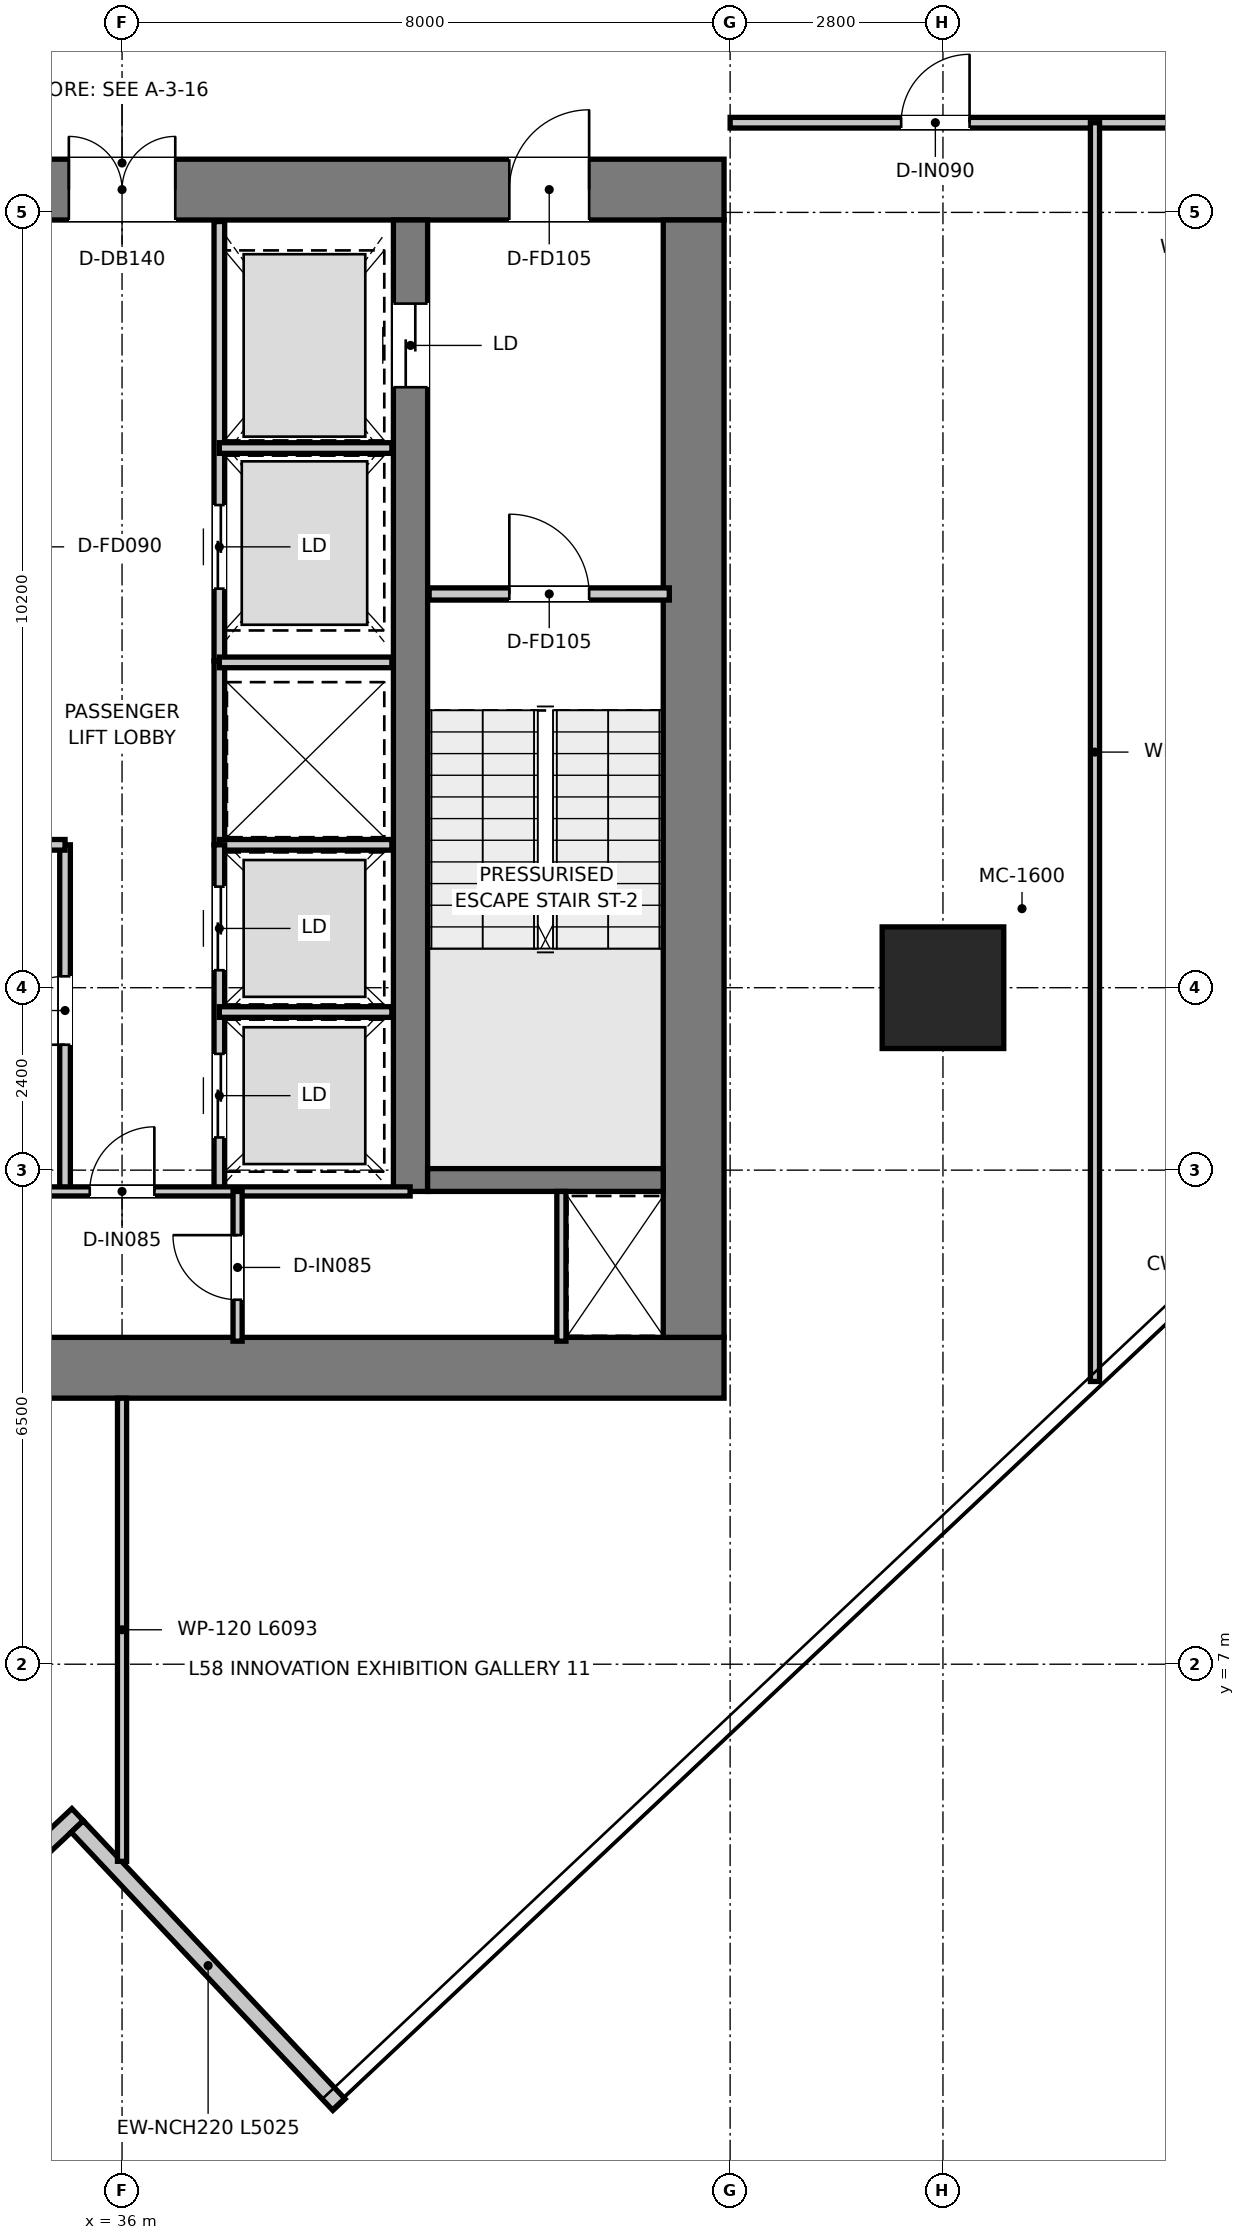
"""IFC4 building model, lengths in metres.
Left out: names, types, materials, properties, quantities, classifications, styles, units other than length and angle.
Written with IfcOpenShell. Run it as: python <this file> out.ifc"""

import sys

from ifc_helpers import new_model, si_unit, direction, frame, frame_2d, origin, origin_2d, place, context, subcontext, project, spatial, rectangle, extrude, source, transform, mapped, element, fill, save


model = new_model("IFC4")
c1 = context("Model", 3, precision=1e-05, world=origin(), true_north=direction((0.0, 1.0)))
c2 = subcontext(c1, "Body", "Model", "MODEL_VIEW")
j1 = project(units=[si_unit("LENGTHUNIT", "METRE"), si_unit("PLANEANGLEUNIT", "RADIAN")], contexts=[c1])
p1 = place(None, origin())
s1 = spatial("IfcSite", under=j1, at=p1, CompositionType="ELEMENT")
p2 = place(p1, origin())
s2 = spatial("IfcBuilding", under=s1, at=p2, CompositionType="ELEMENT")
p3 = place(p2, frame((0.0, 0.0, 238.9)))
s3 = spatial("IfcBuildingStorey", under=s2, at=p3, CompositionType="ELEMENT", Elevation=238.9)
p4 = place(p3, frame((28.08, 10.9, 0.0), z_axis=(0.0, 0.0, 1.0), x_axis=(1.0, 0.0, 0.0)))
e1 = element("IfcWall", 1, at=p4, inside=s3, PredefinedType="SHEAR", context=c2, shape_type="SweptSolid", body=[
    extrude(rectangle(XDim=15.84, YDim=0.8, at=frame_2d((7.92, 0.0))), origin(), (0.0, 0.0, 1.0), 3.95),
])
p5 = place(p3, frame((28.08, 26.4, 0.0), z_axis=(0.0, 0.0, 1.0), x_axis=(1.0, 0.0, 0.0)))
e2 = element("IfcWall", 2, at=p5, inside=s3, PredefinedType="SHEAR", context=c2, shape_type="SweptSolid", body=[
    extrude(rectangle(XDim=15.84, YDim=0.8, at=frame_2d((7.92, 0.0))), origin(), (0.0, 0.0, 1.0), 3.95),
])
p6 = place(p5, frame((7.22, 0.0, 0.0)))
e3 = element("IfcOpeningElement", 3, at=p6, cuts=e2, PredefinedType="OPENING", context=c2, shape_type="SweptSolid", body=[
    extrude(rectangle(XDim=1.4, YDim=2.2, at=frame_2d((0.7, 1.1))), frame((0.0, 0.41, 0.0), z_axis=(0.0, -1.0, 0.0), x_axis=(1.0, 0.0, 0.0)), (0.0, 0.0, 1.0), 0.82),
])
p7 = place(p5, frame((1.775, 0.0, 0.0)))
e4 = element("IfcOpeningElement", 4, at=p7, cuts=e2, PredefinedType="OPENING", context=c2, shape_type="SweptSolid", body=[
    extrude(rectangle(XDim=1.05, YDim=2.1, at=frame_2d((0.525, 1.05))), frame((0.0, 0.41, 0.0), z_axis=(0.0, -1.0, 0.0), x_axis=(1.0, 0.0, 0.0)), (0.0, 0.0, 1.0), 0.82),
])
p8 = place(p5, frame((13.015, 0.0, 0.0)))
e5 = element("IfcOpeningElement", 5, at=p8, cuts=e2, PredefinedType="OPENING", context=c2, shape_type="SweptSolid", body=[
    extrude(rectangle(XDim=1.05, YDim=2.1, at=frame_2d((0.525, 1.05))), frame((0.0, 0.41, 0.0), z_axis=(0.0, -1.0, 0.0), x_axis=(1.0, 0.0, 0.0)), (0.0, 0.0, 1.0), 0.82),
])
p9 = place(p3, frame((43.52, 11.3, 0.0), z_axis=(0.0, 0.0, 1.0), x_axis=(0.0, 1.0, 0.0)))
e6 = element("IfcWall", 6, at=p9, inside=s3, PredefinedType="SHEAR", context=c2, shape_type="SweptSolid", body=[
    extrude(rectangle(XDim=14.7, YDim=0.8, at=frame_2d((7.35, 0.0))), origin(), (0.0, 0.0, 1.0), 3.95),
])
p10 = place(p3, frame((39.795, 13.22, 0.0), z_axis=(0.0, 0.0, 1.0), x_axis=(0.0, 1.0, 0.0)))
e7 = element("IfcWall", 7, at=p10, inside=s3, PredefinedType="SHEAR", context=c2, shape_type="SweptSolid", body=[
    extrude(rectangle(XDim=12.78, YDim=0.45, at=frame_2d((6.39, 0.0))), origin(), (0.0, 0.0, 1.0), 3.95),
])
p11 = place(p10, frame((10.58, 0.0, 0.0)))
e8 = element("IfcOpeningElement", 8, at=p11, cuts=e7, PredefinedType="OPENING", context=c2, shape_type="SweptSolid", body=[
    extrude(rectangle(XDim=1.1, YDim=2.15, at=frame_2d((0.55, 1.075))), frame((0.0, 0.235, 0.0), z_axis=(0.0, -1.0, 0.0), x_axis=(1.0, 0.0, 0.0)), (0.0, 0.0, 1.0), 0.47),
])
p12 = place(p3, frame((40.02, 13.37, 0.0), z_axis=(0.0, 0.0, 1.0), x_axis=(1.0, 0.0, 0.0)))
e9 = element("IfcWall", 9, at=p12, inside=s3, PredefinedType="SHEAR", context=c2, shape_type="SweptSolid", body=[
    extrude(rectangle(XDim=3.1, YDim=0.3, at=frame_2d((1.55, 0.0))), origin(), (0.0, 0.0, 1.0), 3.95),
])
m1 = source(origin(), c2, "Body", "SweptSolid", [
    extrude(rectangle(XDim=1.6, YDim=1.6, at=origin_2d()), origin(), (0.0, 0.0, 1.0), 3.95),
])
p13 = place(p3, frame((46.8, 15.9, 0.0), z_axis=(0.0, 0.0, 1.0), x_axis=(1.0, 0.0, 0.0)))
e10 = element("IfcColumn", 10, at=p13, inside=s3, PredefinedType="USERDEFINED", context=c2, shape_type="MappedRepresentation", body=[
    mapped(m1, transform((0.0, 0.0, 0.0), x_axis=(1.0, 0.0, 0.0), y_axis=(0.0, 1.0, 0.0), z_axis=(0.0, 0.0, 1.0), scale=1.0)),
])
p14 = place(p3, frame((31.595, 1.427, 0.0), z_axis=(0.0, 0.0, 1.0), x_axis=(0.728374884992, 0.685178828418, 0.0)))
e11 = element("IfcWall", 11, at=p14, inside=s3, PredefinedType="ELEMENTEDWALL", context=c2, shape_type="SweptSolid", body=[
    extrude(rectangle(XDim=5.245, YDim=0.22, at=frame_2d((2.623, 0.0))), origin(), (0.0, 0.0, 1.0), 3.67),
])
p15 = place(p3, frame((35.411, 4.865, 0.0), z_axis=(0.0, 0.0, 1.0), x_axis=(0.685205552999, -0.728349744381, 0.0)))
e12 = element("IfcWall", 12, at=p15, inside=s3, PredefinedType="ELEMENTEDWALL", context=c2, shape_type="SweptSolid", body=[
    extrude(rectangle(XDim=5.025, YDim=0.22, at=frame_2d((2.512, 0.0))), origin(), (0.0, 0.0, 1.0), 3.67),
])
p16 = place(p3, frame((40.04, 21.08, 0.0), z_axis=(0.0, 0.0, 1.0), x_axis=(1.0, 0.0, 0.0)))
e13 = element("IfcWall", 13, at=p16, inside=s3, PredefinedType="PARTITIONING", context=c2, shape_type="SweptSolid", body=[
    extrude(rectangle(XDim=3.16, YDim=0.16, at=frame_2d((1.58, 0.0))), origin(), (0.0, 0.0, 1.0), 3.67),
])
p17 = place(p16, frame((1.055, 0.0, 0.0)))
e14 = element("IfcOpeningElement", 14, at=p17, cuts=e13, PredefinedType="OPENING", context=c2, shape_type="SweptSolid", body=[
    extrude(rectangle(XDim=1.05, YDim=2.1, at=frame_2d((0.525, 1.05))), frame((0.0, 0.09, 0.0), z_axis=(0.0, -1.0, 0.0), x_axis=(1.0, 0.0, 0.0)), (0.0, 0.0, 1.0), 0.18),
])
p18 = place(p3, frame((37.28, 20.2, 0.0), z_axis=(0.0, 0.0, 1.0), x_axis=(0.0, 1.0, 0.0)))
e15 = element("IfcWall", 15, at=p18, inside=s3, PredefinedType="PARTITIONING", context=c2, shape_type="SweptSolid", body=[
    extrude(rectangle(XDim=5.78, YDim=0.14, at=frame_2d((2.89, 0.0))), origin(), (0.0, 0.0, 1.0), 2.67),
])
p19 = place(p18, frame((0.95, 0.0, 0.0)))
e16 = element("IfcOpeningElement", 16, at=p19, cuts=e15, PredefinedType="OPENING", context=c2, shape_type="SweptSolid", body=[
    extrude(rectangle(XDim=1.1, YDim=2.15, at=frame_2d((0.55, 1.075))), frame((0.0, 0.08, 0.0), z_axis=(0.0, -1.0, 0.0), x_axis=(1.0, 0.0, 0.0)), (0.0, 0.0, 1.0), 0.16),
])
p20 = place(p3, frame((37.28, 23.0, 0.0), z_axis=(0.0, 0.0, 1.0), x_axis=(1.0, 0.0, 0.0)))
e17 = element("IfcWall", 17, at=p20, inside=s3, PredefinedType="PARTITIONING", context=c2, shape_type="SweptSolid", body=[
    extrude(rectangle(XDim=2.27, YDim=0.14, at=frame_2d((1.135, 0.0))), origin(), (0.0, 0.0, 1.0), 2.67),
])
p21 = place(p3, frame((37.28, 17.78, 0.0), z_axis=(0.0, 0.0, 1.0), x_axis=(0.0, 1.0, 0.0)))
e18 = element("IfcWall", 18, at=p21, inside=s3, PredefinedType="PARTITIONING", context=c2, shape_type="SweptSolid", body=[
    extrude(rectangle(XDim=2.42, YDim=0.14, at=frame_2d((1.21, 0.0))), origin(), (0.0, 0.0, 1.0), 3.67),
])
for number, where, z_axis, x_axis in (
    (19, (37.28, 17.78, 0.0), (0.0, 0.0, 1.0), (1.0, 0.0, 0.0)),
    (20, (37.28, 20.18, 0.0), (0.0, 0.0, 1.0), (1.0, 0.0, 0.0)),
):
    element("IfcWall", number, at=place(p3, frame(where, z_axis=z_axis, x_axis=x_axis)), inside=s3, PredefinedType="PARTITIONING", context=c2, shape_type="SweptSolid", body=[
        extrude(rectangle(XDim=2.27, YDim=0.14, at=frame_2d((1.135, 0.0))), origin(), (0.0, 0.0, 1.0), 3.67),
    ])
p22 = place(p3, frame((35.25, 13.22, 0.0), z_axis=(0.0, 0.0, 1.0), x_axis=(0.0, 1.0, 0.0)))
e21 = element("IfcWall", 21, at=p22, inside=s3, PredefinedType="PARTITIONING", context=c2, shape_type="SweptSolid", body=[
    extrude(rectangle(XDim=4.56, YDim=0.14, at=frame_2d((2.28, 0.0))), origin(), (0.0, 0.0, 1.0), 3.67),
])
p23 = place(p22, frame((1.93, 0.0, 0.0)))
e22 = element("IfcOpeningElement", 22, at=p23, cuts=e21, PredefinedType="OPENING", context=c2, shape_type="SweptSolid", body=[
    extrude(rectangle(XDim=0.9, YDim=2.1, at=frame_2d((0.45, 1.05))), frame((0.0, 0.08, 0.0), z_axis=(0.0, -1.0, 0.0), x_axis=(1.0, 0.0, 0.0)), (0.0, 0.0, 1.0), 0.16),
])
p24 = place(p3, frame((34.72, 17.78, 0.0), z_axis=(0.0, 0.0, 1.0), x_axis=(1.0, 0.0, 0.0)))
e23 = element("IfcWall", 23, at=p24, inside=s3, PredefinedType="PARTITIONING", context=c2, shape_type="SweptSolid", body=[
    extrude(rectangle(XDim=0.53, YDim=0.14, at=frame_2d((0.265, 0.0))), origin(), (0.0, 0.0, 1.0), 3.67),
])
p25 = place(p3, frame((37.28, 13.22, 0.0), z_axis=(0.0, 0.0, 1.0), x_axis=(0.0, 1.0, 0.0)))
e24 = element("IfcWall", 24, at=p25, inside=s3, PredefinedType="PARTITIONING", context=c2, shape_type="SweptSolid", body=[
    extrude(rectangle(XDim=4.56, YDim=0.14, at=frame_2d((2.28, 0.0))), origin(), (0.0, 0.0, 1.0), 3.67),
])
p26 = place(p25, frame((0.71, 0.0, 0.0)))
e25 = element("IfcOpeningElement", 25, at=p26, cuts=e24, PredefinedType="OPENING", context=c2, shape_type="SweptSolid", body=[
    extrude(rectangle(XDim=1.1, YDim=2.15, at=frame_2d((0.55, 1.075))), frame((0.0, 0.08, 0.0), z_axis=(0.0, -1.0, 0.0), x_axis=(1.0, 0.0, 0.0)), (0.0, 0.0, 1.0), 0.16),
])
p27 = place(p25, frame((2.91, 0.0, 0.0)))
e26 = element("IfcOpeningElement", 26, at=p27, cuts=e24, PredefinedType="OPENING", context=c2, shape_type="SweptSolid", body=[
    extrude(rectangle(XDim=1.1, YDim=2.15, at=frame_2d((0.55, 1.075))), frame((0.0, 0.08, 0.0), z_axis=(0.0, -1.0, 0.0), x_axis=(1.0, 0.0, 0.0)), (0.0, 0.0, 1.0), 0.16),
])
p28 = place(p3, frame((37.28, 15.58, 0.0), z_axis=(0.0, 0.0, 1.0), x_axis=(1.0, 0.0, 0.0)))
e27 = element("IfcWall", 27, at=p28, inside=s3, PredefinedType="PARTITIONING", context=c2, shape_type="SweptSolid", body=[
    extrude(rectangle(XDim=2.27, YDim=0.14, at=frame_2d((1.135, 0.0))), origin(), (0.0, 0.0, 1.0), 3.67),
])
p29 = place(p3, frame((41.78, 11.25, 0.0), z_axis=(0.0, 0.0, 1.0), x_axis=(0.0, 1.0, 0.0)))
e28 = element("IfcWall", 28, at=p29, inside=s3, PredefinedType="PARTITIONING", context=c2, shape_type="SweptSolid", body=[
    extrude(rectangle(XDim=1.97, YDim=0.12, at=frame_2d((0.985, 0.0))), origin(), (0.0, 0.0, 1.0), 3.67),
])
p30 = place(p3, frame((32.21, 13.22, 0.0), z_axis=(0.0, 0.0, 1.0), x_axis=(1.0, 0.0, 0.0)))
e29 = element("IfcWall", 29, at=p30, inside=s3, PredefinedType="PARTITIONING", context=c2, shape_type="SweptSolid", body=[
    extrude(rectangle(XDim=7.58, YDim=0.12, at=frame_2d((3.79, 0.0))), origin(), (0.0, 0.0, 1.0), 3.67),
])
p31 = place(p30, frame((3.365, 0.0, 0.0)))
e30 = element("IfcOpeningElement", 30, at=p31, cuts=e29, PredefinedType="OPENING", context=c2, shape_type="SweptSolid", body=[
    extrude(rectangle(XDim=0.85, YDim=2.1, at=frame_2d((0.425, 1.05))), frame((0.0, 0.07, 0.0), z_axis=(0.0, -1.0, 0.0), x_axis=(1.0, 0.0, 0.0)), (0.0, 0.0, 1.0), 0.14),
])
p32 = place(p3, frame((37.52, 11.25, 0.0), z_axis=(0.0, 0.0, 1.0), x_axis=(0.0, 1.0, 0.0)))
e31 = element("IfcWall", 31, at=p32, inside=s3, PredefinedType="PARTITIONING", context=c2, shape_type="SweptSolid", body=[
    extrude(rectangle(XDim=1.97, YDim=0.12, at=frame_2d((0.985, 0.0))), origin(), (0.0, 0.0, 1.0), 3.67),
])
p33 = place(p32, frame((0.545, 0.0, 0.0)))
e32 = element("IfcOpeningElement", 32, at=p33, cuts=e31, PredefinedType="OPENING", context=c2, shape_type="SweptSolid", body=[
    extrude(rectangle(XDim=0.85, YDim=2.1, at=frame_2d((0.425, 1.05))), frame((0.0, 0.07, 0.0), z_axis=(0.0, -1.0, 0.0), x_axis=(1.0, 0.0, 0.0)), (0.0, 0.0, 1.0), 0.14),
])
p34 = place(p3, frame((44.0, 27.28, 0.0), z_axis=(0.0, 0.0, 1.0), x_axis=(1.0, 0.0, 0.0)))
e33 = element("IfcWall", 33, at=p34, inside=s3, PredefinedType="PARTITIONING", context=c2, shape_type="SweptSolid", body=[
    extrude(rectangle(XDim=14.91, YDim=0.14, at=frame_2d((7.455, 0.0))), origin(), (0.0, 0.0, 1.0), 3.03),
])
p35 = place(p34, frame((2.25, 0.0, 0.0)))
e34 = element("IfcOpeningElement", 34, at=p35, cuts=e33, PredefinedType="OPENING", context=c2, shape_type="SweptSolid", body=[
    extrude(rectangle(XDim=0.9, YDim=2.1, at=frame_2d((0.45, 1.05))), frame((0.0, 0.08, 0.0), z_axis=(0.0, -1.0, 0.0), x_axis=(1.0, 0.0, 0.0)), (0.0, 0.0, 1.0), 0.16),
])
p36 = place(p34, frame((10.17, 0.0, 0.0)))
e35 = element("IfcOpeningElement", 35, at=p36, cuts=e33, PredefinedType="OPENING", context=c2, shape_type="SweptSolid", body=[
    extrude(rectangle(XDim=0.9, YDim=2.1, at=frame_2d((0.45, 1.05))), frame((0.0, 0.08, 0.0), z_axis=(0.0, -1.0, 0.0), x_axis=(1.0, 0.0, 0.0)), (0.0, 0.0, 1.0), 0.16),
])
p37 = place(p3, frame((36.0, 4.407, 0.0), z_axis=(0.0, 0.0, 1.0), x_axis=(0.0, 1.0, 0.0)))
e36 = element("IfcWall", 36, at=p37, inside=s3, PredefinedType="PARTITIONING", context=c2, shape_type="SweptSolid", body=[
    extrude(rectangle(XDim=6.093, YDim=0.12, at=frame_2d((3.047, 0.0))), origin(), (0.0, 0.0, 1.0), 3.67),
])
p38 = place(p3, frame((48.8, 10.719, 0.0), z_axis=(0.0, 0.0, 1.0), x_axis=(0.0, 1.0, 0.0)))
e37 = element("IfcWall", 37, at=p38, inside=s3, PredefinedType="PARTITIONING", context=c2, shape_type="SweptSolid", body=[
    extrude(rectangle(XDim=16.561, YDim=0.12, at=frame_2d((8.28, 0.0))), origin(), (0.0, 0.0, 1.0), 3.18),
])
p39 = place(p17, origin())
e38 = element("IfcDoor", 38, at=p39, inside=s3, OperationType="SINGLE_SWING_LEFT", PredefinedType="DOOR", context=c2, shape_type="SweptSolid", body=[
    extrude(rectangle(XDim=1.05, YDim=2.1, at=frame_2d((0.525, 1.05))), frame((0.0, 0.025, 0.0), z_axis=(0.0, -1.0, 0.0), x_axis=(1.0, 0.0, 0.0)), (0.0, 0.0, 1.0), 0.05),
])
fill(e14, e38)
p40 = place(p6, origin())
e39 = element("IfcDoor", 39, at=p40, inside=s3, OperationType="DOUBLE_DOOR_SINGLE_SWING", PredefinedType="DOOR", context=c2, shape_type="SweptSolid", body=[
    extrude(rectangle(XDim=1.4, YDim=2.2, at=frame_2d((0.7, 1.1))), frame((0.0, 0.025, 0.0), z_axis=(0.0, -1.0, 0.0), x_axis=(1.0, 0.0, 0.0)), (0.0, 0.0, 1.0), 0.05),
])
fill(e3, e39)
p41 = place(p8, origin())
e40 = element("IfcDoor", 40, at=p41, inside=s3, OperationType="SINGLE_SWING_RIGHT", PredefinedType="DOOR", context=c2, shape_type="SweptSolid", body=[
    extrude(rectangle(XDim=1.05, YDim=2.1, at=frame_2d((0.525, 1.05))), frame((0.0, 0.025, 0.0), z_axis=(0.0, -1.0, 0.0), x_axis=(1.0, 0.0, 0.0)), (0.0, 0.0, 1.0), 0.05),
])
fill(e5, e40)
p42 = place(p11, origin())
e41 = element("IfcDoor", 41, at=p42, inside=s3, OperationType="DOUBLE_DOOR_SLIDING", PredefinedType="DOOR", context=c2, shape_type="SweptSolid", body=[
    extrude(rectangle(XDim=1.1, YDim=2.15, at=frame_2d((0.55, 1.075))), frame((0.0, 0.025, 0.0), z_axis=(0.0, -1.0, 0.0), x_axis=(1.0, 0.0, 0.0)), (0.0, 0.0, 1.0), 0.05),
])
fill(e8, e41)
p43 = place(p19, origin())
e42 = element("IfcDoor", 42, at=p43, inside=s3, OperationType="DOUBLE_DOOR_SLIDING", PredefinedType="DOOR", context=c2, shape_type="SweptSolid", body=[
    extrude(rectangle(XDim=1.1, YDim=2.15, at=frame_2d((0.55, 1.075))), frame((0.0, 0.025, 0.0), z_axis=(0.0, -1.0, 0.0), x_axis=(1.0, 0.0, 0.0)), (0.0, 0.0, 1.0), 0.05),
])
fill(e16, e42)
p44 = place(p23, origin())
e43 = element("IfcDoor", 43, at=p44, inside=s3, OperationType="SINGLE_SWING_LEFT", PredefinedType="DOOR", context=c2, shape_type="SweptSolid", body=[
    extrude(rectangle(XDim=0.9, YDim=2.1, at=frame_2d((0.45, 1.05))), frame((0.0, 0.025, 0.0), z_axis=(0.0, -1.0, 0.0), x_axis=(1.0, 0.0, 0.0)), (0.0, 0.0, 1.0), 0.05),
])
fill(e22, e43)
p45 = place(p26, origin())
e44 = element("IfcDoor", 44, at=p45, inside=s3, OperationType="DOUBLE_DOOR_SLIDING", PredefinedType="DOOR", context=c2, shape_type="SweptSolid", body=[
    extrude(rectangle(XDim=1.1, YDim=2.15, at=frame_2d((0.55, 1.075))), frame((0.0, 0.025, 0.0), z_axis=(0.0, -1.0, 0.0), x_axis=(1.0, 0.0, 0.0)), (0.0, 0.0, 1.0), 0.05),
])
fill(e25, e44)
p46 = place(p27, origin())
e45 = element("IfcDoor", 45, at=p46, inside=s3, OperationType="DOUBLE_DOOR_SLIDING", PredefinedType="DOOR", context=c2, shape_type="SweptSolid", body=[
    extrude(rectangle(XDim=1.1, YDim=2.15, at=frame_2d((0.55, 1.075))), frame((0.0, 0.025, 0.0), z_axis=(0.0, -1.0, 0.0), x_axis=(1.0, 0.0, 0.0)), (0.0, 0.0, 1.0), 0.05),
])
fill(e26, e45)
p47 = place(p31, origin())
e46 = element("IfcDoor", 46, at=p47, inside=s3, OperationType="SINGLE_SWING_RIGHT", PredefinedType="DOOR", context=c2, shape_type="SweptSolid", body=[
    extrude(rectangle(XDim=0.85, YDim=2.1, at=frame_2d((0.425, 1.05))), frame((0.0, 0.025, 0.0), z_axis=(0.0, -1.0, 0.0), x_axis=(1.0, 0.0, 0.0)), (0.0, 0.0, 1.0), 0.05),
])
fill(e30, e46)
p48 = place(p33, origin())
e47 = element("IfcDoor", 47, at=p48, inside=s3, OperationType="SINGLE_SWING_RIGHT", PredefinedType="DOOR", context=c2, shape_type="SweptSolid", body=[
    extrude(rectangle(XDim=0.85, YDim=2.1, at=frame_2d((0.425, 1.05))), frame((0.0, 0.025, 0.0), z_axis=(0.0, -1.0, 0.0), x_axis=(1.0, 0.0, 0.0)), (0.0, 0.0, 1.0), 0.05),
])
fill(e32, e47)
p49 = place(p35, origin())
e48 = element("IfcDoor", 48, at=p49, inside=s3, OperationType="SINGLE_SWING_RIGHT", PredefinedType="DOOR", context=c2, shape_type="SweptSolid", body=[
    extrude(rectangle(XDim=0.9, YDim=2.1, at=frame_2d((0.45, 1.05))), frame((0.0, 0.025, 0.0), z_axis=(0.0, -1.0, 0.0), x_axis=(1.0, 0.0, 0.0)), (0.0, 0.0, 1.0), 0.05),
])
fill(e34, e48)
save(model, sys.argv[1])
